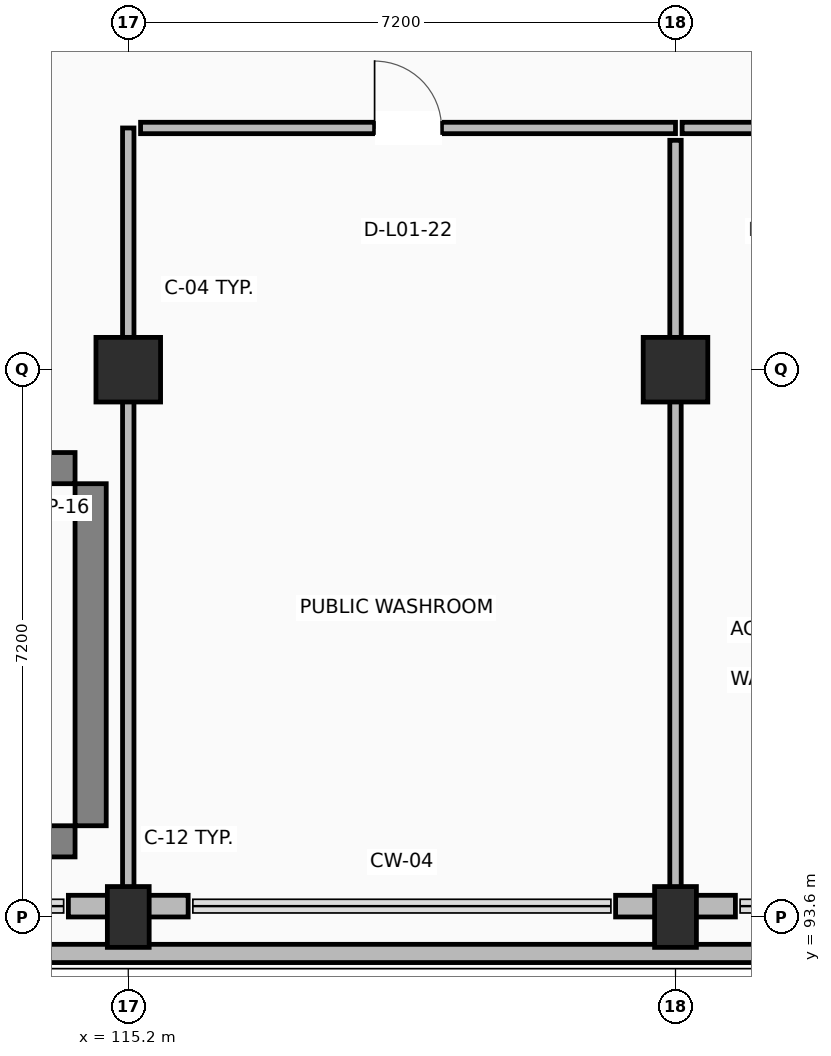
"""IFC4 building model, lengths in metres.
Left out: names, types, materials, properties, quantities, classifications, styles, units other than length and angle.
Written with IfcOpenShell. Run it as: python <this file> out.ifc"""

import sys

from ifc_helpers import new_model, si_unit, direction, frame, frame_2d, origin, origin_2d, place, context, subcontext, project, spatial, rectangle, extrude, element, fill, save


model = new_model("IFC4")
c1 = context("Model", 3, precision=1e-05, world=origin(), true_north=direction((0.0, 1.0)))
c2 = subcontext(c1, "Body", "Model", "MODEL_VIEW")
j1 = project(units=[si_unit("LENGTHUNIT", "METRE"), si_unit("PLANEANGLEUNIT", "RADIAN")], contexts=[c1])
p1 = place(None, origin())
s1 = spatial("IfcSite", under=j1, at=p1, CompositionType="ELEMENT")
p2 = place(p1, origin())
s2 = spatial("IfcBuilding", under=s1, at=p2, CompositionType="ELEMENT")
p3 = place(p2, frame((0.0, 0.0, 4.5)))
s3 = spatial("IfcBuildingStorey", under=s2, at=p3, CompositionType="ELEMENT", Elevation=4.5)
p4 = place(p3, frame((115.2, 93.6, 0.0), z_axis=(0.0, 0.0, 1.0), x_axis=(1.0, 0.0, 0.0)))
e1 = element("IfcColumn", 1, at=p4, inside=s3, PredefinedType="COLUMN", context=c2, shape_type="SweptSolid", body=[
    extrude(rectangle(XDim=0.55, YDim=0.8, at=origin_2d()), origin(), (0.0, 0.0, 1.0), 4.22),
])
p5 = place(p3, frame((115.2, 100.8, 0.0), z_axis=(0.0, 0.0, 1.0), x_axis=(1.0, 0.0, 0.0)))
e2 = element("IfcColumn", 2, at=p5, inside=s3, PredefinedType="COLUMN", context=c2, shape_type="SweptSolid", body=[
    extrude(rectangle(XDim=0.85, YDim=0.85, at=origin_2d()), origin(), (0.0, 0.0, 1.0), 4.22),
])
p6 = place(p3, frame((122.4, 93.6, 0.0), z_axis=(0.0, 0.0, 1.0), x_axis=(1.0, 0.0, 0.0)))
e3 = element("IfcColumn", 3, at=p6, inside=s3, PredefinedType="COLUMN", context=c2, shape_type="SweptSolid", body=[
    extrude(rectangle(XDim=0.55, YDim=0.8, at=origin_2d()), origin(), (0.0, 0.0, 1.0), 4.22),
])
p7 = place(p3, frame((122.4, 100.8, 0.0), z_axis=(0.0, 0.0, 1.0), x_axis=(1.0, 0.0, 0.0)))
e4 = element("IfcColumn", 4, at=p7, inside=s3, PredefinedType="COLUMN", context=c2, shape_type="SweptSolid", body=[
    extrude(rectangle(XDim=0.85, YDim=0.85, at=origin_2d()), origin(), (0.0, 0.0, 1.0), 4.22),
])
for number, where, z_axis, x_axis in (
    (5, (105.0, 94.595, 0.0), (0.0, 0.0, 1.0), (1.0, 0.0, 0.0)),
    (6, (105.0, 99.505, 0.0), (0.0, 0.0, 1.0), (1.0, 0.0, 0.0)),
):
    element("IfcWall", number, at=place(p3, frame(where, z_axis=z_axis, x_axis=x_axis)), inside=s3, PredefinedType="SHEAR", context=c2, shape_type="SweptSolid", body=[
        extrude(rectangle(XDim=9.5, YDim=0.41, at=frame_2d((4.75, 0.0))), origin(), (0.0, 0.0, 1.0), 4.22),
    ])
p8 = place(p3, frame((114.705, 94.8, 0.0), z_axis=(0.0, 0.0, 1.0), x_axis=(0.0, 1.0, 0.0)))
e7 = element("IfcWall", 7, at=p8, inside=s3, PredefinedType="SHEAR", context=c2, shape_type="SweptSolid", body=[
    extrude(rectangle(XDim=4.5, YDim=0.41, at=frame_2d((2.25, 0.0))), origin(), (0.0, 0.0, 1.0), 4.22),
])
for number, where, z_axis, x_axis in (
    (8, (114.412, 93.742, 0.0), (0.0, 0.0, 1.0), (1.0, 0.0, 0.0)),
    (9, (121.612, 93.742, 0.0), (0.0, 0.0, 1.0), (1.0, 0.0, 0.0)),
):
    element("IfcWall", number, at=place(p3, frame(where, z_axis=z_axis, x_axis=x_axis)), inside=s3, PredefinedType="STANDARD", context=c2, shape_type="SweptSolid", body=[
        extrude(rectangle(XDim=1.576, YDim=0.285, at=frame_2d((0.788, 0.0))), origin(), (0.0, 0.0, 1.0), 3.26),
    ])
p9 = place(p3, frame((136.44, 93.12, 0.0), z_axis=(0.0, 0.0, 1.0), x_axis=(-1.0, 0.0, 0.0)))
e10 = element("IfcWall", 10, at=p9, inside=s3, PredefinedType="PARAPET", context=c2, shape_type="SweptSolid", body=[
    extrude(rectangle(XDim=57.84, YDim=0.24, at=frame_2d((28.92, 0.0))), origin(), (0.0, 0.0, 1.0), 1.12),
])
p10 = place(p3, frame((115.2, 93.972, 0.0), z_axis=(0.0, 0.0, 1.0), x_axis=(0.0, 1.0, 0.0)))
e11 = element("IfcWall", 11, at=p10, inside=s3, PredefinedType="PARTITIONING", context=c2, shape_type="SweptSolid", body=[
    extrude(rectangle(XDim=10.008, YDim=0.15, at=frame_2d((5.004, 0.0))), origin(), (0.0, 0.0, 1.0), 3.26),
])
p11 = place(p3, frame((115.362, 103.98, 0.0), z_axis=(0.0, 0.0, 1.0), x_axis=(1.0, 0.0, 0.0)))
e12 = element("IfcWall", 12, at=p11, inside=s3, PredefinedType="PARTITIONING", context=c2, shape_type="SweptSolid", body=[
    extrude(rectangle(XDim=7.038, YDim=0.15, at=frame_2d((3.519, 0.0))), origin(), (0.0, 0.0, 1.0), 3.26),
])
p12 = place(p11, frame((3.079, 0.0, 0.0)))
e13 = element("IfcOpeningElement", 13, at=p12, cuts=e12, PredefinedType="OPENING", context=c2, shape_type="SweptSolid", body=[
    extrude(rectangle(XDim=0.88, YDim=2.1, at=frame_2d((0.44, 1.05))), frame((0.0, 0.085, 0.0), z_axis=(0.0, -1.0, 0.0), x_axis=(1.0, 0.0, 0.0)), (0.0, 0.0, 1.0), 0.17),
])
p13 = place(p3, frame((122.4, 103.818, 0.0), z_axis=(0.0, 0.0, 1.0), x_axis=(0.0, -1.0, 0.0)))
e14 = element("IfcWall", 14, at=p13, inside=s3, PredefinedType="PARTITIONING", context=c2, shape_type="SweptSolid", body=[
    extrude(rectangle(XDim=9.846, YDim=0.15, at=frame_2d((4.923, 0.0))), origin(), (0.0, 0.0, 1.0), 3.26),
])
p14 = place(p3, frame((122.487, 103.98, 0.0), z_axis=(0.0, 0.0, 1.0), x_axis=(1.0, 0.0, 0.0)))
e15 = element("IfcWall", 15, at=p14, inside=s3, PredefinedType="PARTITIONING", context=c2, shape_type="SweptSolid", body=[
    extrude(rectangle(XDim=2.913, YDim=0.15, at=frame_2d((1.457, 0.0))), origin(), (0.0, 0.0, 1.0), 3.26),
])
p15 = place(p14, frame((1.007, 0.0, 0.0)))
e16 = element("IfcOpeningElement", 16, at=p15, cuts=e15, PredefinedType="OPENING", context=c2, shape_type="SweptSolid", body=[
    extrude(rectangle(XDim=0.9, YDim=2.1, at=frame_2d((0.45, 1.05))), frame((0.0, 0.085, 0.0), z_axis=(0.0, -1.0, 0.0), x_axis=(1.0, 0.0, 0.0)), (0.0, 0.0, 1.0), 0.17),
])
p16 = place(p12, origin())
e17 = element("IfcDoor", 17, at=p16, inside=s3, OperationType="SINGLE_SWING_LEFT", PredefinedType="DOOR", context=c2, shape_type="SweptSolid", body=[
    extrude(rectangle(XDim=0.88, YDim=2.1, at=frame_2d((0.44, 1.05))), frame((0.0, 0.025, 0.0), z_axis=(0.0, -1.0, 0.0), x_axis=(1.0, 0.0, 0.0)), (0.0, 0.0, 1.0), 0.05),
])
fill(e13, e17)
save(model, sys.argv[1])
